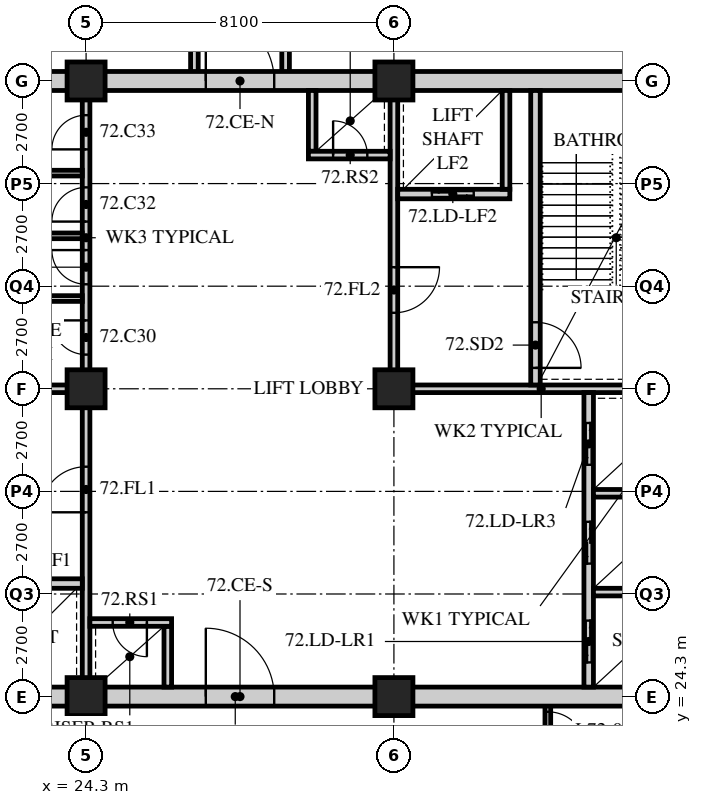
"""IFC4 building model, lengths in metres.
Left out: names, types, materials, properties, quantities, classifications, styles, units other than length and angle.
Written with IfcOpenShell. Run it as: python <this file> out.ifc"""

import sys

from ifc_helpers import new_model, si_unit, direction, frame, frame_2d, origin, origin_2d, place, context, subcontext, project, spatial, rectangle, hollow_rectangle, extrude, element, fill, save


model = new_model("IFC4")
c1 = context("Model", 3, precision=1e-05, world=origin(), true_north=direction((0.0, 1.0)))
c2 = subcontext(c1, "Body", "Model", "MODEL_VIEW")
j1 = project(units=[si_unit("LENGTHUNIT", "METRE"), si_unit("PLANEANGLEUNIT", "RADIAN")], contexts=[c1])
p1 = place(None, origin())
s1 = spatial("IfcSite", under=j1, at=p1, CompositionType="ELEMENT")
p2 = place(p1, origin())
s2 = spatial("IfcBuilding", under=s1, at=p2, CompositionType="ELEMENT")
p3 = place(p2, frame((0.0, 0.0, 281.4)))
s3 = spatial("IfcBuildingStorey", under=s2, at=p3, CompositionType="ELEMENT", Elevation=281.4)
for number, where, z_axis, x_axis in (
    (1, (24.3, 24.3, 0.0), (0.0, 0.0, 1.0), (1.0, 0.0, 0.0)),
    (2, (24.3, 32.4, 0.0), (0.0, 0.0, 1.0), (1.0, 0.0, 0.0)),
    (3, (24.3, 40.5, 0.0), (0.0, 0.0, 1.0), (1.0, 0.0, 0.0)),
    (4, (32.4, 24.3, 0.0), (0.0, 0.0, 1.0), (1.0, 0.0, 0.0)),
    (5, (32.4, 32.4, 0.0), (0.0, 0.0, 1.0), (1.0, 0.0, 0.0)),
    (6, (32.4, 40.5, 0.0), (0.0, 0.0, 1.0), (1.0, 0.0, 0.0)),
):
    element("IfcColumn", number, at=place(p3, frame(where, z_axis=z_axis, x_axis=x_axis)), inside=s3, PredefinedType="COLUMN", context=c2, shape_type="SweptSolid", body=[
        extrude(hollow_rectangle(XDim=1.0, YDim=1.0, WallThickness=0.1, at=origin_2d()), origin(), (0.0, 0.0, 1.0), 3.9),
    ])
for number, where, z_axis, x_axis in (
    (7, (27.15, 40.5, 0.0), (0.0, 0.0, 1.0), (0.0, 1.0, 0.0)),
    (8, (29.55, 40.5, 0.0), (0.0, 0.0, 1.0), (0.0, 1.0, 0.0)),
):
    element("IfcWall", number, at=place(p3, frame(where, z_axis=z_axis, x_axis=x_axis)), inside=s3, PredefinedType="SOLIDWALL", context=c2, shape_type="SweptSolid", body=[
        extrude(rectangle(XDim=6.3, YDim=0.2, at=frame_2d((3.15, 0.0))), origin(), (0.0, 0.0, 1.0), 3.69),
    ])
p4 = place(p3, frame((36.45, 22.5, 0.0), z_axis=(0.0, 0.0, 1.0), x_axis=(0.0, 1.0, 0.0)))
e9 = element("IfcWall", 9, at=p4, inside=s3, PredefinedType="PARTITIONING", context=c2, shape_type="SweptSolid", body=[
    extrude(rectangle(XDim=1.8, YDim=0.15, at=frame_2d((0.9, 0.0))), origin(), (0.0, 0.0, 1.0), 3.69),
])
p5 = place(p4, frame((0.4, 0.0, 0.0)))
e10 = element("IfcOpeningElement", 10, at=p5, cuts=e9, PredefinedType="OPENING", context=c2, shape_type="SweptSolid", body=[
    extrude(rectangle(XDim=1.0, YDim=2.1, at=frame_2d((0.5, 1.05))), frame((0.0, 0.085, 0.0), z_axis=(0.0, -1.0, 0.0), x_axis=(1.0, 0.0, 0.0)), (0.0, 0.0, 1.0), 0.17),
])
p6 = place(p3, frame((15.95, 24.3, 0.0), z_axis=(0.0, 0.0, 1.0), x_axis=(1.0, 0.0, 0.0)))
e11 = element("IfcWall", 11, at=p6, inside=s3, PredefinedType="SOLIDWALL", context=c2, shape_type="SweptSolid", body=[
    extrude(rectangle(XDim=24.55, YDim=0.5, at=frame_2d((12.275, 0.0))), origin(), (0.0, 0.0, 1.0), 3.04),
])
p7 = place(p6, frame((11.5, 0.0, 0.0)))
e12 = element("IfcOpeningElement", 12, at=p7, cuts=e11, PredefinedType="OPENING", context=c2, shape_type="SweptSolid", body=[
    extrude(rectangle(XDim=1.8, YDim=2.4, at=frame_2d((0.9, 1.2))), frame((0.0, 0.26, 0.0), z_axis=(0.0, -1.0, 0.0), x_axis=(1.0, 0.0, 0.0)), (0.0, 0.0, 1.0), 0.52),
])
p8 = place(p3, frame((15.95, 40.5, 0.0), z_axis=(0.0, 0.0, 1.0), x_axis=(1.0, 0.0, 0.0)))
e13 = element("IfcWall", 13, at=p8, inside=s3, PredefinedType="SOLIDWALL", context=c2, shape_type="SweptSolid", body=[
    extrude(rectangle(XDim=24.55, YDim=0.5, at=frame_2d((12.275, 0.0))), origin(), (0.0, 0.0, 1.0), 3.04),
])
p9 = place(p8, frame((11.5, 0.0, 0.0)))
e14 = element("IfcOpeningElement", 14, at=p9, cuts=e13, PredefinedType="OPENING", context=c2, shape_type="SweptSolid", body=[
    extrude(rectangle(XDim=1.8, YDim=2.4, at=frame_2d((0.9, 1.2))), frame((0.0, 0.26, 0.0), z_axis=(0.0, -1.0, 0.0), x_axis=(1.0, 0.0, 0.0)), (0.0, 0.0, 1.0), 0.52),
])
p10 = place(p3, frame((16.45, 32.4, 0.0), z_axis=(0.0, 0.0, 1.0), x_axis=(1.0, 0.0, 0.0)))
e15 = element("IfcWall", 15, at=p10, inside=s3, PredefinedType="SOLIDWALL", context=c2, shape_type="SweptSolid", body=[
    extrude(rectangle(XDim=7.95, YDim=0.2, at=frame_2d((3.975, 0.0))), origin(), (0.0, 0.0, 1.0), 3.078),
])
p11 = place(p3, frame((24.3, 24.55, 0.0), z_axis=(0.0, 0.0, 1.0), x_axis=(0.0, 1.0, 0.0)))
e16 = element("IfcWall", 16, at=p11, inside=s3, PredefinedType="SOLIDWALL", context=c2, shape_type="SweptSolid", body=[
    extrude(rectangle(XDim=7.75, YDim=0.2, at=frame_2d((3.875, 0.0))), origin(), (0.0, 0.0, 1.0), 3.078),
])
p12 = place(p11, frame((4.6, 0.0, 0.0)))
e17 = element("IfcOpeningElement", 17, at=p12, cuts=e16, PredefinedType="OPENING", context=c2, shape_type="SweptSolid", body=[
    extrude(rectangle(XDim=1.2, YDim=2.1, at=frame_2d((0.6, 1.05))), frame((0.0, 0.11, 0.0), z_axis=(0.0, -1.0, 0.0), x_axis=(1.0, 0.0, 0.0)), (0.0, 0.0, 1.0), 0.22),
])
p13 = place(p3, frame((21.25, 27.275, 0.0), z_axis=(0.0, 0.0, 1.0), x_axis=(1.0, 0.0, 0.0)))
e18 = element("IfcWall", 18, at=p13, inside=s3, PredefinedType="SOLIDWALL", context=c2, shape_type="SweptSolid", body=[
    extrude(rectangle(XDim=2.95, YDim=0.25, at=frame_2d((1.475, 0.0))), origin(), (0.0, 0.0, 1.0), 3.69),
])
p14 = place(p13, frame((0.95, 0.0, 0.0)))
e19 = element("IfcOpeningElement", 19, at=p14, cuts=e18, PredefinedType="OPENING", context=c2, shape_type="SweptSolid", body=[
    extrude(rectangle(XDim=1.1, YDim=2.4, at=frame_2d((0.55, 1.2))), frame((0.0, 0.135, 0.0), z_axis=(0.0, -1.0, 0.0), x_axis=(1.0, 0.0, 0.0)), (0.0, 0.0, 1.0), 0.27),
])
p15 = place(p3, frame((26.45, 24.55, 0.0), z_axis=(0.0, 0.0, 1.0), x_axis=(0.0, 1.0, 0.0)))
e20 = element("IfcWall", 20, at=p15, inside=s3, PredefinedType="SOLIDWALL", context=c2, shape_type="SweptSolid", body=[
    extrude(rectangle(XDim=1.6, YDim=0.2, at=frame_2d((0.8, 0.0))), origin(), (0.0, 0.0, 1.0), 3.69),
])
p16 = place(p3, frame((24.4, 26.25, 0.0), z_axis=(0.0, 0.0, 1.0), x_axis=(1.0, 0.0, 0.0)))
e21 = element("IfcWall", 21, at=p16, inside=s3, PredefinedType="SOLIDWALL", context=c2, shape_type="SweptSolid", body=[
    extrude(rectangle(XDim=2.15, YDim=0.2, at=frame_2d((1.075, 0.0))), origin(), (0.0, 0.0, 1.0), 3.69),
])
p17 = place(p16, frame((0.6, 0.0, 0.0)))
e22 = element("IfcOpeningElement", 22, at=p17, cuts=e21, PredefinedType="OPENING", context=c2, shape_type="SweptSolid", body=[
    extrude(rectangle(XDim=0.9, YDim=2.1, at=frame_2d((0.45, 1.05))), frame((0.0, 0.11, 0.0), z_axis=(0.0, -1.0, 0.0), x_axis=(1.0, 0.0, 0.0)), (0.0, 0.0, 1.0), 0.22),
])
p18 = place(p3, frame((32.3, 32.4, 0.0), z_axis=(0.0, 0.0, 1.0), x_axis=(1.0, 0.0, 0.0)))
e23 = element("IfcWall", 23, at=p18, inside=s3, PredefinedType="SOLIDWALL", context=c2, shape_type="SweptSolid", body=[
    extrude(rectangle(XDim=7.95, YDim=0.2, at=frame_2d((3.975, 0.0))), origin(), (0.0, 0.0, 1.0), 3.078),
])
p19 = place(p3, frame((32.4, 32.5, 0.0), z_axis=(0.0, 0.0, 1.0), x_axis=(0.0, 1.0, 0.0)))
e24 = element("IfcWall", 24, at=p19, inside=s3, PredefinedType="SOLIDWALL", context=c2, shape_type="SweptSolid", body=[
    extrude(rectangle(XDim=7.75, YDim=0.2, at=frame_2d((3.875, 0.0))), origin(), (0.0, 0.0, 1.0), 3.078),
])
p20 = place(p19, frame((1.9, 0.0, 0.0)))
e25 = element("IfcOpeningElement", 25, at=p20, cuts=e24, PredefinedType="OPENING", context=c2, shape_type="SweptSolid", body=[
    extrude(rectangle(XDim=1.2, YDim=2.1, at=frame_2d((0.6, 1.05))), frame((0.0, 0.11, 0.0), z_axis=(0.0, -1.0, 0.0), x_axis=(1.0, 0.0, 0.0)), (0.0, 0.0, 1.0), 0.22),
])
p21 = place(p3, frame((37.525, 24.55, 0.0), z_axis=(0.0, 0.0, 1.0), x_axis=(0.0, 1.0, 0.0)))
e26 = element("IfcWall", 26, at=p21, inside=s3, PredefinedType="SOLIDWALL", context=c2, shape_type="SweptSolid", body=[
    extrude(rectangle(XDim=7.75, YDim=0.25, at=frame_2d((3.875, 0.0))), origin(), (0.0, 0.0, 1.0), 3.69),
])
p22 = place(p21, frame((0.65, 0.0, 0.0)))
e27 = element("IfcOpeningElement", 27, at=p22, cuts=e26, PredefinedType="OPENING", context=c2, shape_type="SweptSolid", body=[
    extrude(rectangle(XDim=1.1, YDim=2.4, at=frame_2d((0.55, 1.2))), frame((0.0, 0.135, 0.0), z_axis=(0.0, -1.0, 0.0), x_axis=(1.0, 0.0, 0.0)), (0.0, 0.0, 1.0), 0.27),
])
p23 = place(p21, frame((3.25, 0.0, 0.0)))
e28 = element("IfcOpeningElement", 28, at=p23, cuts=e26, PredefinedType="OPENING", context=c2, shape_type="SweptSolid", body=[
    extrude(rectangle(XDim=1.1, YDim=2.4, at=frame_2d((0.55, 1.2))), frame((0.0, 0.135, 0.0), z_axis=(0.0, -1.0, 0.0), x_axis=(1.0, 0.0, 0.0)), (0.0, 0.0, 1.0), 0.27),
])
p24 = place(p21, frame((5.85, 0.0, 0.0)))
e29 = element("IfcOpeningElement", 29, at=p24, cuts=e26, PredefinedType="OPENING", context=c2, shape_type="SweptSolid", body=[
    extrude(rectangle(XDim=1.1, YDim=2.4, at=frame_2d((0.55, 1.2))), frame((0.0, 0.135, 0.0), z_axis=(0.0, -1.0, 0.0), x_axis=(1.0, 0.0, 0.0)), (0.0, 0.0, 1.0), 0.27),
])
for number, where, z_axis, x_axis in (
    (30, (37.65, 27.05, 0.0), (0.0, 0.0, 1.0), (1.0, 0.0, 0.0)),
    (31, (37.65, 29.65, 0.0), (0.0, 0.0, 1.0), (1.0, 0.0, 0.0)),
):
    element("IfcWall", number, at=place(p3, frame(where, z_axis=z_axis, x_axis=x_axis)), inside=s3, PredefinedType="SOLIDWALL", context=c2, shape_type="SweptSolid", body=[
        extrude(rectangle(XDim=2.6, YDim=0.2, at=frame_2d((1.3, 0.0))), origin(), (0.0, 0.0, 1.0), 3.69),
    ])
p25 = place(p3, frame((36.125, 32.5, 0.0), z_axis=(0.0, 0.0, 1.0), x_axis=(0.0, 1.0, 0.0)))
e32 = element("IfcWall", 32, at=p25, inside=s3, PredefinedType="SOLIDWALL", context=c2, shape_type="SweptSolid", body=[
    extrude(rectangle(XDim=7.75, YDim=0.25, at=frame_2d((3.875, 0.0))), origin(), (0.0, 0.0, 1.0), 3.69),
])
p26 = place(p25, frame((0.45, 0.0, 0.0)))
e33 = element("IfcOpeningElement", 33, at=p26, cuts=e32, PredefinedType="OPENING", context=c2, shape_type="SweptSolid", body=[
    extrude(rectangle(XDim=1.2, YDim=2.1, at=frame_2d((0.6, 1.05))), frame((0.0, 0.135, 0.0), z_axis=(0.0, -1.0, 0.0), x_axis=(1.0, 0.0, 0.0)), (0.0, 0.0, 1.0), 0.27),
])
p27 = place(p3, frame((32.5, 37.525, 0.0), z_axis=(0.0, 0.0, 1.0), x_axis=(1.0, 0.0, 0.0)))
e34 = element("IfcWall", 34, at=p27, inside=s3, PredefinedType="SOLIDWALL", context=c2, shape_type="SweptSolid", body=[
    extrude(rectangle(XDim=2.95, YDim=0.25, at=frame_2d((1.475, 0.0))), origin(), (0.0, 0.0, 1.0), 3.69),
])
p28 = place(p27, frame((0.9, 0.0, 0.0)))
e35 = element("IfcOpeningElement", 35, at=p28, cuts=e34, PredefinedType="OPENING", context=c2, shape_type="SweptSolid", body=[
    extrude(rectangle(XDim=1.1, YDim=2.4, at=frame_2d((0.55, 1.2))), frame((0.0, 0.135, 0.0), z_axis=(0.0, -1.0, 0.0), x_axis=(1.0, 0.0, 0.0)), (0.0, 0.0, 1.0), 0.27),
])
p29 = place(p3, frame((35.35, 37.65, 0.0), z_axis=(0.0, 0.0, 1.0), x_axis=(0.0, 1.0, 0.0)))
e36 = element("IfcWall", 36, at=p29, inside=s3, PredefinedType="SOLIDWALL", context=c2, shape_type="SweptSolid", body=[
    extrude(rectangle(XDim=2.6, YDim=0.2, at=frame_2d((1.3, 0.0))), origin(), (0.0, 0.0, 1.0), 3.69),
])
p30 = place(p3, frame((30.25, 38.65, 0.0), z_axis=(0.0, 0.0, 1.0), x_axis=(0.0, 1.0, 0.0)))
e37 = element("IfcWall", 37, at=p30, inside=s3, PredefinedType="SOLIDWALL", context=c2, shape_type="SweptSolid", body=[
    extrude(rectangle(XDim=1.6, YDim=0.2, at=frame_2d((0.8, 0.0))), origin(), (0.0, 0.0, 1.0), 3.69),
])
p31 = place(p3, frame((30.15, 38.55, 0.0), z_axis=(0.0, 0.0, 1.0), x_axis=(1.0, 0.0, 0.0)))
e38 = element("IfcWall", 38, at=p31, inside=s3, PredefinedType="SOLIDWALL", context=c2, shape_type="SweptSolid", body=[
    extrude(rectangle(XDim=2.15, YDim=0.2, at=frame_2d((1.075, 0.0))), origin(), (0.0, 0.0, 1.0), 3.69),
])
p32 = place(p31, frame((0.65, 0.0, 0.0)))
e39 = element("IfcOpeningElement", 39, at=p32, cuts=e38, PredefinedType="OPENING", context=c2, shape_type="SweptSolid", body=[
    extrude(rectangle(XDim=0.9, YDim=2.1, at=frame_2d((0.45, 1.05))), frame((0.0, 0.11, 0.0), z_axis=(0.0, -1.0, 0.0), x_axis=(1.0, 0.0, 0.0)), (0.0, 0.0, 1.0), 0.22),
])
p33 = place(p3, frame((24.3, 32.5, 0.0), z_axis=(0.0, 0.0, 1.0), x_axis=(0.0, 1.0, 0.0)))
e40 = element("IfcWall", 40, at=p33, inside=s3, PredefinedType="PARTITIONING", context=c2, shape_type="SweptSolid", body=[
    extrude(rectangle(XDim=7.75, YDim=0.2, at=frame_2d((3.875, 0.0))), origin(), (0.0, 0.0, 1.0), 3.078),
])
p34 = place(p33, frame((0.8, 0.0, 0.0)))
e41 = element("IfcOpeningElement", 41, at=p34, cuts=e40, PredefinedType="OPENING", context=c2, shape_type="SweptSolid", body=[
    extrude(rectangle(XDim=0.9, YDim=2.1, at=frame_2d((0.45, 1.05))), frame((0.0, 0.11, 0.0), z_axis=(0.0, -1.0, 0.0), x_axis=(1.0, 0.0, 0.0)), (0.0, 0.0, 1.0), 0.22),
])
p35 = place(p33, frame((2.65, 0.0, 0.0)))
e42 = element("IfcOpeningElement", 42, at=p35, cuts=e40, PredefinedType="OPENING", context=c2, shape_type="SweptSolid", body=[
    extrude(rectangle(XDim=0.9, YDim=2.1, at=frame_2d((0.45, 1.05))), frame((0.0, 0.11, 0.0), z_axis=(0.0, -1.0, 0.0), x_axis=(1.0, 0.0, 0.0)), (0.0, 0.0, 1.0), 0.22),
])
p36 = place(p33, frame((4.3, 0.0, 0.0)))
e43 = element("IfcOpeningElement", 43, at=p36, cuts=e40, PredefinedType="OPENING", context=c2, shape_type="SweptSolid", body=[
    extrude(rectangle(XDim=0.9, YDim=2.1, at=frame_2d((0.45, 1.05))), frame((0.0, 0.11, 0.0), z_axis=(0.0, -1.0, 0.0), x_axis=(1.0, 0.0, 0.0)), (0.0, 0.0, 1.0), 0.22),
])
p37 = place(p33, frame((6.2, 0.0, 0.0)))
e44 = element("IfcOpeningElement", 44, at=p37, cuts=e40, PredefinedType="OPENING", context=c2, shape_type="SweptSolid", body=[
    extrude(rectangle(XDim=0.9, YDim=2.1, at=frame_2d((0.45, 1.05))), frame((0.0, 0.11, 0.0), z_axis=(0.0, -1.0, 0.0), x_axis=(1.0, 0.0, 0.0)), (0.0, 0.0, 1.0), 0.22),
])
for number, where, z_axis, x_axis in (
    (45, (21.05, 34.775, 0.0), (0.0, 0.0, 1.0), (1.0, 0.0, 0.0)),
    (46, (21.05, 36.425, 0.0), (0.0, 0.0, 1.0), (1.0, 0.0, 0.0)),
):
    element("IfcWall", number, at=place(p3, frame(where, z_axis=z_axis, x_axis=x_axis)), inside=s3, PredefinedType="PARTITIONING", context=c2, shape_type="SweptSolid", body=[
        extrude(rectangle(XDim=3.15, YDim=0.15, at=frame_2d((1.575, 0.0))), origin(), (0.0, 0.0, 1.0), 3.69),
    ])
p38 = place(p3, frame((21.2, 38.075, 0.0), z_axis=(0.0, 0.0, 1.0), x_axis=(1.0, 0.0, 0.0)))
e47 = element("IfcWall", 47, at=p38, inside=s3, PredefinedType="PARTITIONING", context=c2, shape_type="SweptSolid", body=[
    extrude(rectangle(XDim=3.0, YDim=0.15, at=frame_2d((1.5, 0.0))), origin(), (0.0, 0.0, 1.0), 3.69),
])
p39 = place(p5, origin())
e48 = element("IfcDoor", 48, at=p39, inside=s3, OperationType="SINGLE_SWING_RIGHT", PredefinedType="DOOR", context=c2, shape_type="SweptSolid", body=[
    extrude(rectangle(XDim=1.0, YDim=2.1, at=frame_2d((0.5, 1.05))), frame((0.0, 0.025, 0.0), z_axis=(0.0, -1.0, 0.0), x_axis=(1.0, 0.0, 0.0)), (0.0, 0.0, 1.0), 0.05),
])
fill(e10, e48)
p40 = place(p34, origin())
e49 = element("IfcDoor", 49, at=p40, inside=s3, OperationType="SINGLE_SWING_RIGHT", PredefinedType="DOOR", context=c2, shape_type="SweptSolid", body=[
    extrude(rectangle(XDim=0.9, YDim=2.1, at=frame_2d((0.45, 1.05))), frame((0.0, 0.025, 0.0), z_axis=(0.0, -1.0, 0.0), x_axis=(1.0, 0.0, 0.0)), (0.0, 0.0, 1.0), 0.05),
])
fill(e41, e49)
p41 = place(p35, origin())
e50 = element("IfcDoor", 50, at=p41, inside=s3, OperationType="SINGLE_SWING_RIGHT", PredefinedType="DOOR", context=c2, shape_type="SweptSolid", body=[
    extrude(rectangle(XDim=0.9, YDim=2.1, at=frame_2d((0.45, 1.05))), frame((0.0, 0.025, 0.0), z_axis=(0.0, -1.0, 0.0), x_axis=(1.0, 0.0, 0.0)), (0.0, 0.0, 1.0), 0.05),
])
fill(e42, e50)
p42 = place(p36, origin())
e51 = element("IfcDoor", 51, at=p42, inside=s3, OperationType="SINGLE_SWING_LEFT", PredefinedType="DOOR", context=c2, shape_type="SweptSolid", body=[
    extrude(rectangle(XDim=0.9, YDim=2.1, at=frame_2d((0.45, 1.05))), frame((0.0, 0.025, 0.0), z_axis=(0.0, -1.0, 0.0), x_axis=(1.0, 0.0, 0.0)), (0.0, 0.0, 1.0), 0.05),
])
fill(e43, e51)
p43 = place(p37, origin())
e52 = element("IfcDoor", 52, at=p43, inside=s3, OperationType="SINGLE_SWING_LEFT", PredefinedType="DOOR", context=c2, shape_type="SweptSolid", body=[
    extrude(rectangle(XDim=0.9, YDim=2.1, at=frame_2d((0.45, 1.05))), frame((0.0, 0.025, 0.0), z_axis=(0.0, -1.0, 0.0), x_axis=(1.0, 0.0, 0.0)), (0.0, 0.0, 1.0), 0.05),
])
fill(e44, e52)
p44 = place(p12, origin())
e53 = element("IfcDoor", 53, at=p44, inside=s3, OperationType="SINGLE_SWING_LEFT", PredefinedType="DOOR", context=c2, shape_type="SweptSolid", body=[
    extrude(rectangle(XDim=1.2, YDim=2.1, at=frame_2d((0.6, 1.05))), frame((0.0, 0.025, 0.0), z_axis=(0.0, -1.0, 0.0), x_axis=(1.0, 0.0, 0.0)), (0.0, 0.0, 1.0), 0.05),
])
fill(e17, e53)
p45 = place(p17, origin())
e54 = element("IfcDoor", 54, at=p45, inside=s3, OperationType="SINGLE_SWING_LEFT", PredefinedType="DOOR", context=c2, shape_type="SweptSolid", body=[
    extrude(rectangle(XDim=0.9, YDim=2.1, at=frame_2d((0.45, 1.05))), frame((0.0, 0.025, 0.0), z_axis=(0.0, -1.0, 0.0), x_axis=(1.0, 0.0, 0.0)), (0.0, 0.0, 1.0), 0.05),
])
fill(e22, e54)
p46 = place(p26, origin())
e55 = element("IfcDoor", 55, at=p46, inside=s3, OperationType="SINGLE_SWING_RIGHT", PredefinedType="DOOR", context=c2, shape_type="SweptSolid", body=[
    extrude(rectangle(XDim=1.2, YDim=2.1, at=frame_2d((0.6, 1.05))), frame((0.0, 0.025, 0.0), z_axis=(0.0, -1.0, 0.0), x_axis=(1.0, 0.0, 0.0)), (0.0, 0.0, 1.0), 0.05),
])
fill(e33, e55)
p47 = place(p20, origin())
e56 = element("IfcDoor", 56, at=p47, inside=s3, OperationType="SINGLE_SWING_LEFT", PredefinedType="DOOR", context=c2, shape_type="SweptSolid", body=[
    extrude(rectangle(XDim=1.2, YDim=2.1, at=frame_2d((0.6, 1.05))), frame((0.0, 0.025, 0.0), z_axis=(0.0, -1.0, 0.0), x_axis=(1.0, 0.0, 0.0)), (0.0, 0.0, 1.0), 0.05),
])
fill(e25, e56)
p48 = place(p32, origin())
e57 = element("IfcDoor", 57, at=p48, inside=s3, OperationType="SINGLE_SWING_LEFT", PredefinedType="DOOR", context=c2, shape_type="SweptSolid", body=[
    extrude(rectangle(XDim=0.9, YDim=2.1, at=frame_2d((0.45, 1.05))), frame((0.0, 0.025, 0.0), z_axis=(0.0, -1.0, 0.0), x_axis=(1.0, 0.0, 0.0)), (0.0, 0.0, 1.0), 0.05),
])
fill(e39, e57)
p49 = place(p22, origin())
e58 = element("IfcDoor", 58, at=p49, inside=s3, OperationType="DOUBLE_DOOR_SLIDING", PredefinedType="DOOR", context=c2, shape_type="SweptSolid", body=[
    extrude(rectangle(XDim=1.1, YDim=2.4, at=frame_2d((0.55, 1.2))), frame((0.0, 0.025, 0.0), z_axis=(0.0, -1.0, 0.0), x_axis=(1.0, 0.0, 0.0)), (0.0, 0.0, 1.0), 0.05),
])
fill(e27, e58)
p50 = place(p23, origin())
e59 = element("IfcDoor", 59, at=p50, inside=s3, OperationType="DOUBLE_DOOR_SLIDING", PredefinedType="DOOR", context=c2, shape_type="SweptSolid", body=[
    extrude(rectangle(XDim=1.1, YDim=2.4, at=frame_2d((0.55, 1.2))), frame((0.0, 0.025, 0.0), z_axis=(0.0, -1.0, 0.0), x_axis=(1.0, 0.0, 0.0)), (0.0, 0.0, 1.0), 0.05),
])
fill(e28, e59)
p51 = place(p24, origin())
e60 = element("IfcDoor", 60, at=p51, inside=s3, OperationType="DOUBLE_DOOR_SLIDING", PredefinedType="DOOR", context=c2, shape_type="SweptSolid", body=[
    extrude(rectangle(XDim=1.1, YDim=2.4, at=frame_2d((0.55, 1.2))), frame((0.0, 0.025, 0.0), z_axis=(0.0, -1.0, 0.0), x_axis=(1.0, 0.0, 0.0)), (0.0, 0.0, 1.0), 0.05),
])
fill(e29, e60)
p52 = place(p28, origin())
e61 = element("IfcDoor", 61, at=p52, inside=s3, OperationType="DOUBLE_DOOR_SLIDING", PredefinedType="DOOR", context=c2, shape_type="SweptSolid", body=[
    extrude(rectangle(XDim=1.1, YDim=2.4, at=frame_2d((0.55, 1.2))), frame((0.0, 0.025, 0.0), z_axis=(0.0, -1.0, 0.0), x_axis=(1.0, 0.0, 0.0)), (0.0, 0.0, 1.0), 0.05),
])
fill(e35, e61)
p53 = place(p7, origin())
e62 = element("IfcDoor", 62, at=p53, inside=s3, OperationType="DOUBLE_DOOR_SINGLE_SWING", PredefinedType="DOOR", context=c2, shape_type="SweptSolid", body=[
    extrude(rectangle(XDim=1.8, YDim=2.4, at=frame_2d((0.9, 1.2))), frame((0.0, 0.025, 0.0), z_axis=(0.0, -1.0, 0.0), x_axis=(1.0, 0.0, 0.0)), (0.0, 0.0, 1.0), 0.05),
])
fill(e12, e62)
p54 = place(p9, origin())
e63 = element("IfcDoor", 63, at=p54, inside=s3, OperationType="DOUBLE_DOOR_SINGLE_SWING", PredefinedType="DOOR", context=c2, shape_type="SweptSolid", body=[
    extrude(rectangle(XDim=1.8, YDim=2.4, at=frame_2d((0.9, 1.2))), frame((0.0, 0.025, 0.0), z_axis=(0.0, -1.0, 0.0), x_axis=(1.0, 0.0, 0.0)), (0.0, 0.0, 1.0), 0.05),
])
fill(e14, e63)
save(model, sys.argv[1])
